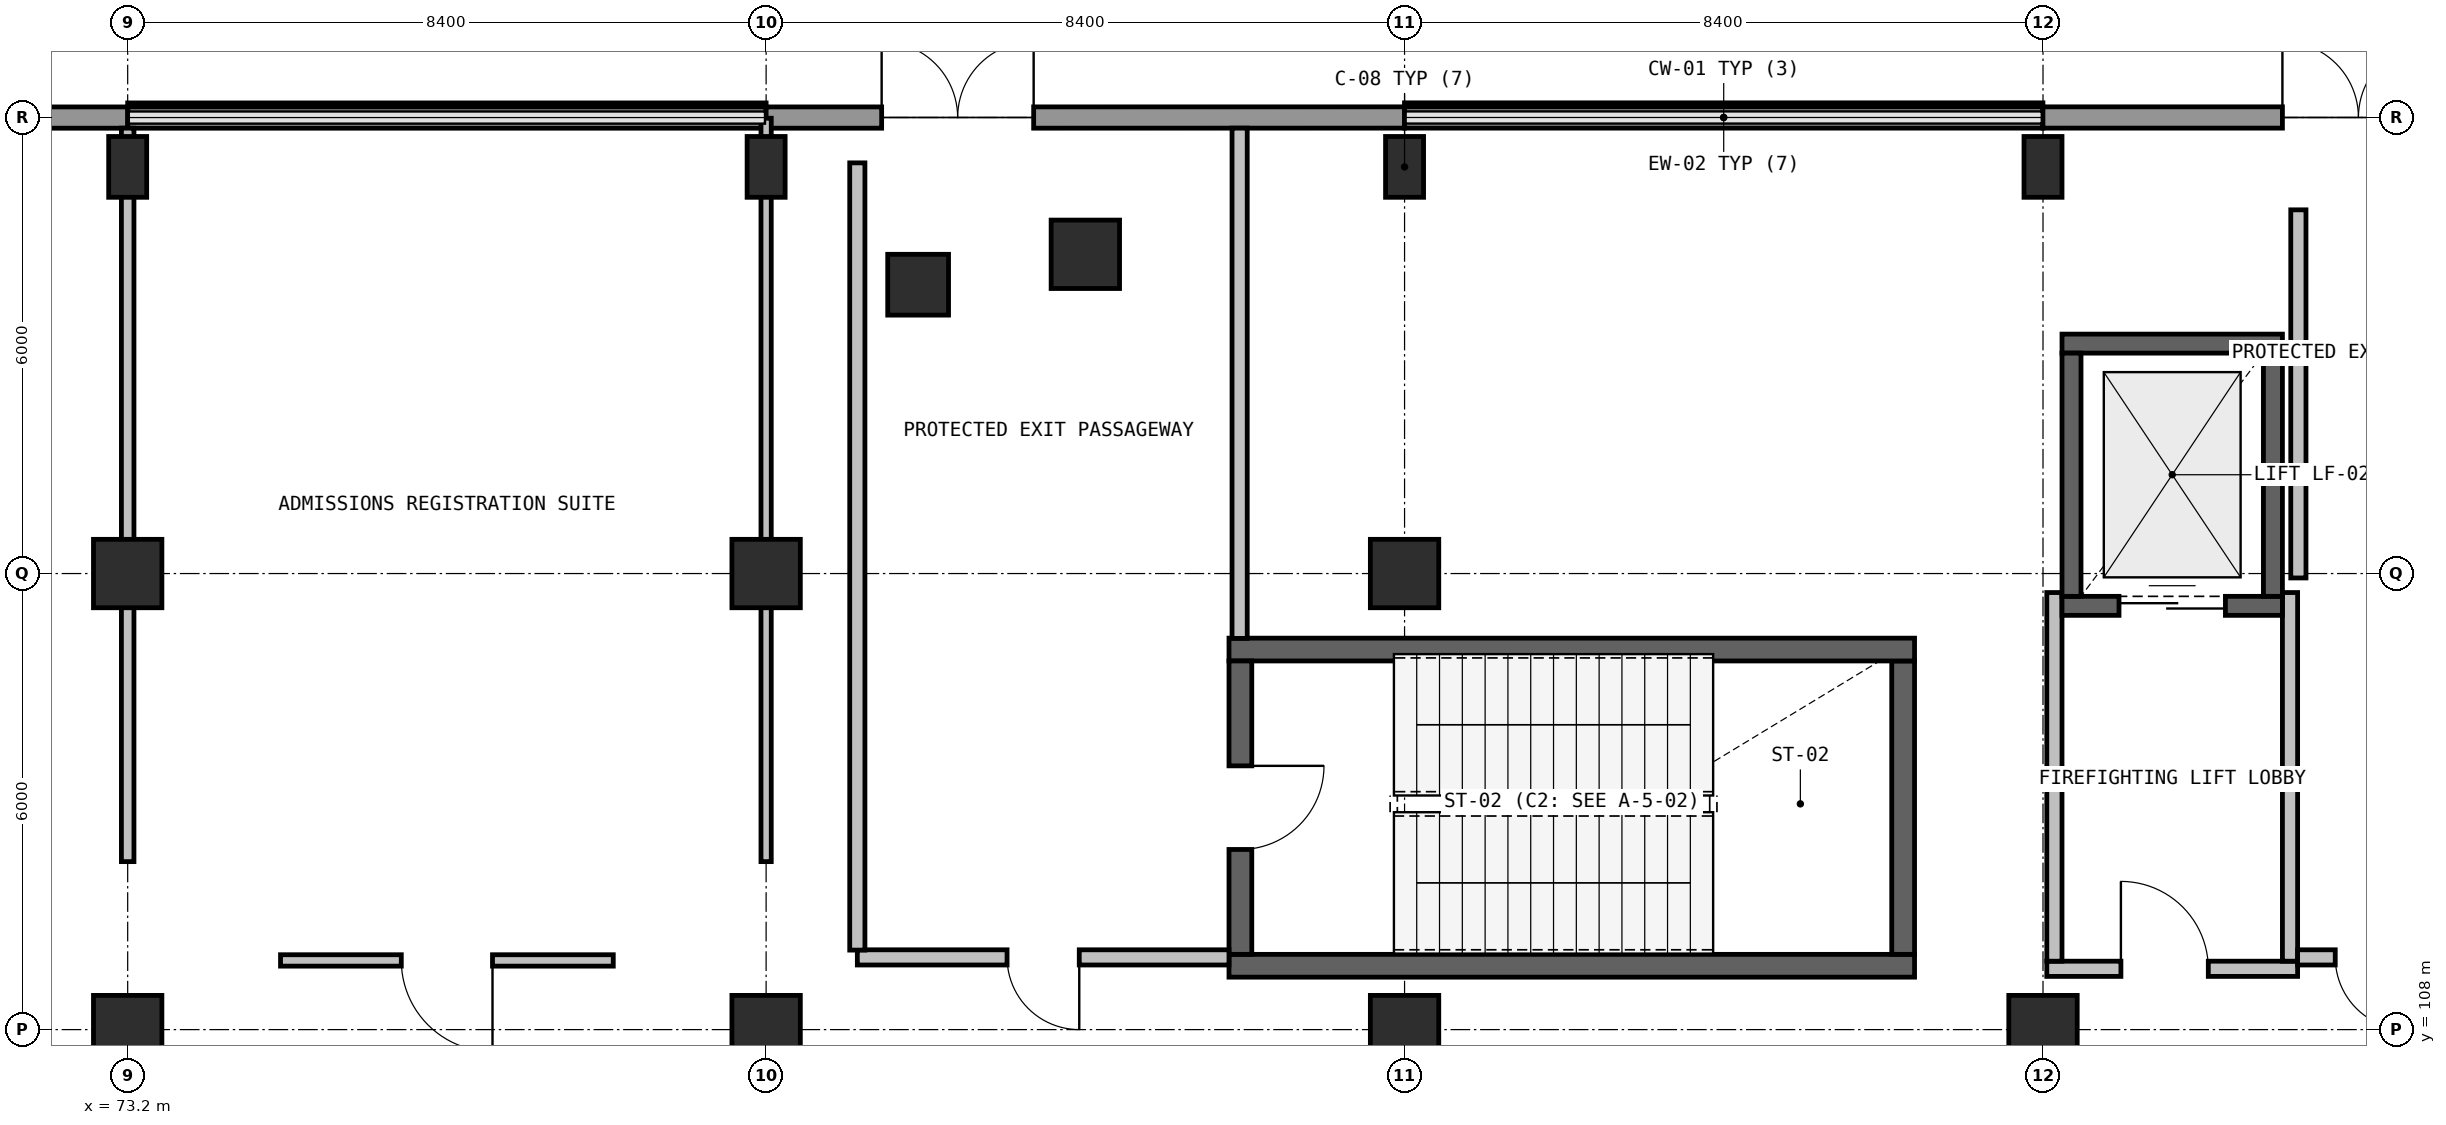
"""IFC4 building model, lengths in metres.
Left out: names, types, materials, properties, quantities, classifications, styles, units other than length and angle.
Written with IfcOpenShell. Run it as: python <this file> out.ifc"""

import sys

from ifc_helpers import new_model, si_unit, direction, frame, frame_2d, origin, origin_2d, place, context, subcontext, project, spatial, rectangle, extrude, element, fill, save


model = new_model("IFC4")
c1 = context("Model", 3, precision=1e-05, world=origin(), true_north=direction((0.0, 1.0)))
c2 = subcontext(c1, "Body", "Model", "MODEL_VIEW")
j1 = project(units=[si_unit("LENGTHUNIT", "METRE"), si_unit("PLANEANGLEUNIT", "RADIAN")], contexts=[c1])
p1 = place(None, origin())
s1 = spatial("IfcSite", under=j1, at=p1, CompositionType="ELEMENT")
p2 = place(p1, origin())
s2 = spatial("IfcBuilding", under=s1, at=p2, CompositionType="ELEMENT")
p3 = place(p2, origin())
s3 = spatial("IfcBuildingStorey", under=s2, at=p3, CompositionType="ELEMENT", Elevation=0.0)
p4 = place(p3, frame((83.6, 117.8, 0.0), z_axis=(0.0, 0.0, 1.0), x_axis=(1.0, 0.0, 0.0)))
e1 = element("IfcColumn", 1, at=p4, inside=s3, PredefinedType="COLUMN", context=c2, shape_type="SweptSolid", body=[
    extrude(rectangle(XDim=0.8, YDim=0.8, at=origin_2d()), origin(), (0.0, 0.0, 1.0), 5.4),
])
for number, where, z_axis, x_axis in (
    (2, (85.8, 118.2, 0.0), (0.0, 0.0, 1.0), (1.0, 0.0, 0.0)),
    (3, (73.2, 108.0, 0.0), (0.0, 0.0, 1.0), (1.0, 0.0, 0.0)),
    (4, (73.2, 114.0, 0.0), (0.0, 0.0, 1.0), (1.0, 0.0, 0.0)),
):
    element("IfcColumn", number, at=place(p3, frame(where, z_axis=z_axis, x_axis=x_axis)), inside=s3, PredefinedType="COLUMN", context=c2, shape_type="SweptSolid", body=[
        extrude(rectangle(XDim=0.9, YDim=0.9, at=origin_2d()), origin(), (0.0, 0.0, 1.0), 5.4),
    ])
p5 = place(p3, frame((73.2, 119.35, 0.0), z_axis=(0.0, 0.0, 1.0), x_axis=(1.0, 0.0, 0.0)))
e5 = element("IfcColumn", 5, at=p5, inside=s3, PredefinedType="COLUMN", context=c2, shape_type="SweptSolid", body=[
    extrude(rectangle(XDim=0.5, YDim=0.8, at=origin_2d()), origin(), (0.0, 0.0, 1.0), 5.4),
])
for number, where, z_axis, x_axis in (
    (6, (81.6, 108.0, 0.0), (0.0, 0.0, 1.0), (1.0, 0.0, 0.0)),
    (7, (81.6, 114.0, 0.0), (0.0, 0.0, 1.0), (1.0, 0.0, 0.0)),
):
    element("IfcColumn", number, at=place(p3, frame(where, z_axis=z_axis, x_axis=x_axis)), inside=s3, PredefinedType="COLUMN", context=c2, shape_type="SweptSolid", body=[
        extrude(rectangle(XDim=0.9, YDim=0.9, at=origin_2d()), origin(), (0.0, 0.0, 1.0), 5.4),
    ])
p6 = place(p3, frame((81.6, 119.35, 0.0), z_axis=(0.0, 0.0, 1.0), x_axis=(1.0, 0.0, 0.0)))
e8 = element("IfcColumn", 8, at=p6, inside=s3, PredefinedType="COLUMN", context=c2, shape_type="SweptSolid", body=[
    extrude(rectangle(XDim=0.5, YDim=0.8, at=origin_2d()), origin(), (0.0, 0.0, 1.0), 5.4),
])
for number, where, z_axis, x_axis in (
    (9, (90.0, 108.0, 0.0), (0.0, 0.0, 1.0), (1.0, 0.0, 0.0)),
    (10, (90.0, 114.0, 0.0), (0.0, 0.0, 1.0), (1.0, 0.0, 0.0)),
):
    element("IfcColumn", number, at=place(p3, frame(where, z_axis=z_axis, x_axis=x_axis)), inside=s3, PredefinedType="COLUMN", context=c2, shape_type="SweptSolid", body=[
        extrude(rectangle(XDim=0.9, YDim=0.9, at=origin_2d()), origin(), (0.0, 0.0, 1.0), 5.4),
    ])
p7 = place(p3, frame((90.0, 119.35, 0.0), z_axis=(0.0, 0.0, 1.0), x_axis=(1.0, 0.0, 0.0)))
e11 = element("IfcColumn", 11, at=p7, inside=s3, PredefinedType="COLUMN", context=c2, shape_type="SweptSolid", body=[
    extrude(rectangle(XDim=0.5, YDim=0.8, at=origin_2d()), origin(), (0.0, 0.0, 1.0), 5.4),
])
p8 = place(p3, frame((98.4, 108.0, 0.0), z_axis=(0.0, 0.0, 1.0), x_axis=(1.0, 0.0, 0.0)))
e12 = element("IfcColumn", 12, at=p8, inside=s3, PredefinedType="COLUMN", context=c2, shape_type="SweptSolid", body=[
    extrude(rectangle(XDim=0.9, YDim=0.9, at=origin_2d()), origin(), (0.0, 0.0, 1.0), 5.4),
])
p9 = place(p3, frame((98.4, 119.35, 0.0), z_axis=(0.0, 0.0, 1.0), x_axis=(1.0, 0.0, 0.0)))
e13 = element("IfcColumn", 13, at=p9, inside=s3, PredefinedType="COLUMN", context=c2, shape_type="SweptSolid", body=[
    extrude(rectangle(XDim=0.5, YDim=0.8, at=origin_2d()), origin(), (0.0, 0.0, 1.0), 5.4),
])
p10 = place(p3, frame((64.8, 119.999, 0.0), z_axis=(0.0, 0.0, 1.0), x_axis=(1.0, 0.0, 0.0)))
e14 = element("IfcWall", 14, at=p10, inside=s3, PredefinedType="SOLIDWALL", context=c2, shape_type="SweptSolid", body=[
    extrude(rectangle(XDim=8.4, YDim=0.28, at=frame_2d((4.2, 0.0))), origin(), (0.0, 0.0, 1.0), 5.08),
])
p11 = place(p10, frame((3.2, 0.0, 0.0)))
e15 = element("IfcOpeningElement", 15, at=p11, cuts=e14, PredefinedType="OPENING", context=c2, shape_type="SweptSolid", body=[
    extrude(rectangle(XDim=2.0, YDim=2.3, at=frame_2d((1.0, 1.15))), frame((0.0, 0.15, 0.0), z_axis=(0.0, -1.0, 0.0), x_axis=(1.0, 0.0, 0.0)), (0.0, 0.0, 1.0), 0.3),
])
p12 = place(p3, frame((73.202, 119.999, 0.0), z_axis=(0.0, 0.0, 1.0), x_axis=(1.0, 0.0, 0.0)))
e16 = element("IfcWall", 16, at=p12, inside=s3, PredefinedType="SOLIDWALL", context=c2, shape_type="SweptSolid", body=[
    extrude(rectangle(XDim=8.396, YDim=0.28, at=frame_2d((4.198, 0.0))), origin(), (0.0, 0.0, 1.0), 0.94),
])
p13 = place(p3, frame((81.6, 119.999, 0.0), z_axis=(0.0, 0.0, 1.0), x_axis=(0.99999999324, 0.000116272309, 0.0)))
e17 = element("IfcWall", 17, at=p13, inside=s3, PredefinedType="SOLIDWALL", context=c2, shape_type="SweptSolid", body=[
    extrude(rectangle(XDim=8.399, YDim=0.28, at=frame_2d((4.199, 0.0))), origin(), (0.0, 0.0, 1.0), 5.08),
])
p14 = place(p13, frame((1.52, 0.0, 0.0)))
e18 = element("IfcOpeningElement", 18, at=p14, cuts=e17, PredefinedType="OPENING", context=c2, shape_type="SweptSolid", body=[
    extrude(rectangle(XDim=2.0, YDim=2.3, at=frame_2d((1.0, 1.15))), frame((0.0, 0.15, 0.0), z_axis=(0.0, -1.0, 0.0), x_axis=(1.0, 0.0, 0.0)), (0.0, 0.0, 1.0), 0.3),
])
p15 = place(p3, frame((90.001, 120.0, 0.0), z_axis=(0.0, 0.0, 1.0), x_axis=(1.0, 0.0, 0.0)))
e19 = element("IfcWall", 19, at=p15, inside=s3, PredefinedType="SOLIDWALL", context=c2, shape_type="SweptSolid", body=[
    extrude(rectangle(XDim=8.396, YDim=0.28, at=frame_2d((4.198, 0.0))), origin(), (0.0, 0.0, 1.0), 0.94),
])
p16 = place(p3, frame((98.399, 120.0, 0.0), z_axis=(0.0, 0.0, 1.0), x_axis=(1.0, 0.0, 0.0)))
e20 = element("IfcWall", 20, at=p16, inside=s3, PredefinedType="SOLIDWALL", context=c2, shape_type="SweptSolid", body=[
    extrude(rectangle(XDim=8.4, YDim=0.28, at=frame_2d((4.2, 0.0))), origin(), (0.0, 0.0, 1.0), 5.08),
])
p17 = place(p16, frame((3.151, 0.0, 0.0)))
e21 = element("IfcOpeningElement", 21, at=p17, cuts=e20, PredefinedType="OPENING", context=c2, shape_type="SweptSolid", body=[
    extrude(rectangle(XDim=2.0, YDim=2.3, at=frame_2d((1.0, 1.15))), frame((0.0, 0.15, 0.0), z_axis=(0.0, -1.0, 0.0), x_axis=(1.0, 0.0, 0.0)), (0.0, 0.0, 1.0), 0.3),
])
p18 = place(p3, frame((87.69, 108.84, 0.0), z_axis=(0.0, 0.0, 1.0), x_axis=(1.0, 0.0, 0.0)))
e22 = element("IfcWall", 22, at=p18, inside=s3, PredefinedType="SHEAR", context=c2, shape_type="SweptSolid", body=[
    extrude(rectangle(XDim=9.02, YDim=0.3, at=frame_2d((4.51, 0.0))), origin(), (0.0, 0.0, 1.0), 5.08),
])
p19 = place(p3, frame((96.56, 108.99, 0.0), z_axis=(0.0, 0.0, 1.0), x_axis=(0.0, 1.0, 0.0)))
e23 = element("IfcWall", 23, at=p19, inside=s3, PredefinedType="SHEAR", context=c2, shape_type="SweptSolid", body=[
    extrude(rectangle(XDim=3.86, YDim=0.3, at=frame_2d((1.93, 0.0))), origin(), (0.0, 0.0, 1.0), 5.08),
])
p20 = place(p3, frame((96.71, 113.0, 0.0), z_axis=(0.0, 0.0, 1.0), x_axis=(-1.0, 0.0, 0.0)))
e24 = element("IfcWall", 24, at=p20, inside=s3, PredefinedType="SHEAR", context=c2, shape_type="SweptSolid", body=[
    extrude(rectangle(XDim=9.02, YDim=0.3, at=frame_2d((4.51, 0.0))), origin(), (0.0, 0.0, 1.0), 5.08),
])
p21 = place(p3, frame((87.84, 112.85, 0.0), z_axis=(0.0, 0.0, 1.0), x_axis=(0.0, -1.0, 0.0)))
e25 = element("IfcWall", 25, at=p21, inside=s3, PredefinedType="SHEAR", context=c2, shape_type="SweptSolid", body=[
    extrude(rectangle(XDim=3.86, YDim=0.3, at=frame_2d((1.93, 0.0))), origin(), (0.0, 0.0, 1.0), 5.08),
])
p22 = place(p21, frame((1.38, 0.0, 0.0)))
e26 = element("IfcOpeningElement", 26, at=p22, cuts=e25, PredefinedType="OPENING", context=c2, shape_type="SweptSolid", body=[
    extrude(rectangle(XDim=1.1, YDim=2.15, at=frame_2d((0.55, 1.075))), frame((0.0, 0.16, 0.0), z_axis=(0.0, -1.0, 0.0), x_axis=(1.0, 0.0, 0.0)), (0.0, 0.0, 1.0), 0.32),
])
p23 = place(p3, frame((98.45, 108.8, 0.0), z_axis=(0.0, 0.0, 1.0), x_axis=(1.0, 0.0, 0.0)))
e27 = element("IfcWall", 27, at=p23, inside=s3, PredefinedType="SOLIDWALL", context=c2, shape_type="SweptSolid", body=[
    extrude(rectangle(XDim=3.3, YDim=0.2, at=frame_2d((1.65, 0.0))), origin(), (0.0, 0.0, 1.0), 5.08),
])
p24 = place(p23, frame((0.975, 0.0, 0.0)))
e28 = element("IfcOpeningElement", 28, at=p24, cuts=e27, PredefinedType="OPENING", context=c2, shape_type="SweptSolid", body=[
    extrude(rectangle(XDim=1.15, YDim=2.15, at=frame_2d((0.575, 1.075))), frame((0.0, 0.11, 0.0), z_axis=(0.0, -1.0, 0.0), x_axis=(1.0, 0.0, 0.0)), (0.0, 0.0, 1.0), 0.22),
])
p25 = place(p3, frame((101.65, 108.9, 0.0), z_axis=(0.0, 0.0, 1.0), x_axis=(0.0, 1.0, 0.0)))
e29 = element("IfcWall", 29, at=p25, inside=s3, PredefinedType="SOLIDWALL", context=c2, shape_type="SweptSolid", body=[
    extrude(rectangle(XDim=4.85, YDim=0.2, at=frame_2d((2.425, 0.0))), origin(), (0.0, 0.0, 1.0), 5.08),
])
p26 = place(p3, frame((98.55, 113.75, 0.0), z_axis=(0.0, 0.0, 1.0), x_axis=(0.0, -1.0, 0.0)))
e30 = element("IfcWall", 30, at=p26, inside=s3, PredefinedType="SOLIDWALL", context=c2, shape_type="SweptSolid", body=[
    extrude(rectangle(XDim=4.85, YDim=0.2, at=frame_2d((2.425, 0.0))), origin(), (0.0, 0.0, 1.0), 4.33),
])
p27 = place(p3, frame((98.65, 113.575, 0.0), z_axis=(0.0, 0.0, 1.0), x_axis=(1.0, 0.0, 0.0)))
e31 = element("IfcWall", 31, at=p27, inside=s3, PredefinedType="SHEAR", context=c2, shape_type="SweptSolid", body=[
    extrude(rectangle(XDim=2.9, YDim=0.25, at=frame_2d((1.45, 0.0))), origin(), (0.0, 0.0, 1.0), 5.08),
])
p28 = place(p27, frame((0.75, 0.0, 0.0)))
e32 = element("IfcOpeningElement", 32, at=p28, cuts=e31, PredefinedType="OPENING", context=c2, shape_type="SweptSolid", body=[
    extrude(rectangle(XDim=1.4, YDim=2.15, at=frame_2d((0.7, 1.075))), frame((0.0, 0.135, 0.0), z_axis=(0.0, -1.0, 0.0), x_axis=(1.0, 0.0, 0.0)), (0.0, 0.0, 1.0), 0.27),
])
p29 = place(p3, frame((101.425, 113.7, 0.0), z_axis=(0.0, 0.0, 1.0), x_axis=(0.0, 1.0, 0.0)))
e33 = element("IfcWall", 33, at=p29, inside=s3, PredefinedType="SHEAR", context=c2, shape_type="SweptSolid", body=[
    extrude(rectangle(XDim=3.2, YDim=0.25, at=frame_2d((1.6, 0.0))), origin(), (0.0, 0.0, 1.0), 5.08),
])
p30 = place(p3, frame((101.55, 117.025, 0.0), z_axis=(0.0, 0.0, 1.0), x_axis=(-1.0, 0.0, 0.0)))
e34 = element("IfcWall", 34, at=p30, inside=s3, PredefinedType="SHEAR", context=c2, shape_type="SweptSolid", body=[
    extrude(rectangle(XDim=2.9, YDim=0.25, at=frame_2d((1.45, 0.0))), origin(), (0.0, 0.0, 1.0), 5.08),
])
p31 = place(p3, frame((98.775, 116.9, 0.0), z_axis=(0.0, 0.0, 1.0), x_axis=(0.0, -1.0, 0.0)))
e35 = element("IfcWall", 35, at=p31, inside=s3, PredefinedType="SHEAR", context=c2, shape_type="SweptSolid", body=[
    extrude(rectangle(XDim=3.2, YDim=0.25, at=frame_2d((1.6, 0.0))), origin(), (0.0, 0.0, 1.0), 5.08),
])
p32 = place(p3, frame((87.83, 119.86, 0.0), z_axis=(0.0, 0.0, 1.0), x_axis=(0.0, -1.0, 0.0)))
e36 = element("IfcWall", 36, at=p32, inside=s3, PredefinedType="SOLIDWALL", context=c2, shape_type="SweptSolid", body=[
    extrude(rectangle(XDim=6.713, YDim=0.2, at=frame_2d((3.356, 0.0))), origin(), (0.0, 0.0, 1.0), 5.08),
])
p33 = place(p3, frame((87.69, 108.95, 0.0), z_axis=(0.0, 0.0, 1.0), x_axis=(-1.0, 0.0, 0.0)))
e37 = element("IfcWall", 37, at=p33, inside=s3, PredefinedType="SOLIDWALL", context=c2, shape_type="SweptSolid", body=[
    extrude(rectangle(XDim=4.89, YDim=0.2, at=frame_2d((2.445, 0.0))), origin(), (0.0, 0.0, 1.0), 5.08),
])
p34 = place(p33, frame((1.97, 0.0, 0.0)))
e38 = element("IfcOpeningElement", 38, at=p34, cuts=e37, PredefinedType="OPENING", context=c2, shape_type="SweptSolid", body=[
    extrude(rectangle(XDim=0.95, YDim=2.1, at=frame_2d((0.475, 1.05))), frame((0.0, 0.11, 0.0), z_axis=(0.0, -1.0, 0.0), x_axis=(1.0, 0.0, 0.0)), (0.0, 0.0, 1.0), 0.22),
])
p35 = place(p3, frame((82.8, 109.046, 0.0), z_axis=(0.0, 0.0, 1.0), x_axis=(0.0, 1.0, 0.0)))
e39 = element("IfcWall", 39, at=p35, inside=s3, PredefinedType="SOLIDWALL", context=c2, shape_type="SweptSolid", body=[
    extrude(rectangle(XDim=10.357, YDim=0.2, at=frame_2d((5.179, 0.0))), origin(), (0.0, 0.0, 1.0), 5.08),
])
p36 = place(p3, frame((103.69, 108.95, 0.0), z_axis=(0.0, 0.0, 1.0), x_axis=(-1.0, 0.0, 0.0)))
e40 = element("IfcWall", 40, at=p36, inside=s3, PredefinedType="SOLIDWALL", context=c2, shape_type="SweptSolid", body=[
    extrude(rectangle(XDim=1.94, YDim=0.2, at=frame_2d((0.97, 0.0))), origin(), (0.0, 0.0, 1.0), 5.08),
])
p37 = place(p36, frame((0.495, 0.0, 0.0)))
e41 = element("IfcOpeningElement", 41, at=p37, cuts=e40, PredefinedType="OPENING", context=c2, shape_type="SweptSolid", body=[
    extrude(rectangle(XDim=0.95, YDim=2.1, at=frame_2d((0.475, 1.05))), frame((0.0, 0.11, 0.0), z_axis=(0.0, -1.0, 0.0), x_axis=(1.0, 0.0, 0.0)), (0.0, 0.0, 1.0), 0.22),
])
p38 = place(p3, frame((101.76, 113.942, 0.0), z_axis=(0.0, 0.0, 1.0), x_axis=(0.0, 1.0, 0.0)))
e42 = element("IfcWall", 42, at=p38, inside=s3, PredefinedType="SOLIDWALL", context=c2, shape_type="SweptSolid", body=[
    extrude(rectangle(XDim=4.843, YDim=0.2, at=frame_2d((2.421, 0.0))), origin(), (0.0, 0.0, 1.0), 5.08),
])
p39 = place(p3, frame((73.2, 119.86, 0.0), z_axis=(0.0, 0.0, 1.0), x_axis=(0.0, -1.0, 0.0)))
e43 = element("IfcWall", 43, at=p39, inside=s3, PredefinedType="PARTITIONING", context=c2, shape_type="SweptSolid", body=[
    extrude(rectangle(XDim=9.65, YDim=0.165, at=frame_2d((4.825, 0.0))), origin(), (0.0, 0.0, 1.0), 4.33),
])
p40 = place(p3, frame((79.589, 108.91, 0.0), z_axis=(0.0, 0.0, 1.0), x_axis=(-1.0, 0.0, 0.0)))
e44 = element("IfcWall", 44, at=p40, inside=s3, PredefinedType="PARTITIONING", context=c2, shape_type="SweptSolid", body=[
    extrude(rectangle(XDim=4.378, YDim=0.15, at=frame_2d((2.189, 0.0))), origin(), (0.0, 0.0, 1.0), 5.08),
])
p41 = place(p40, frame((1.589, 0.0, 0.0)))
e45 = element("IfcOpeningElement", 45, at=p41, cuts=e44, PredefinedType="OPENING", context=c2, shape_type="SweptSolid", body=[
    extrude(rectangle(XDim=1.2, YDim=2.15, at=frame_2d((0.6, 1.075))), frame((0.0, 0.085, 0.0), z_axis=(0.0, -1.0, 0.0), x_axis=(1.0, 0.0, 0.0)), (0.0, 0.0, 1.0), 0.17),
])
p42 = place(p3, frame((81.6, 119.99, 0.0), z_axis=(0.0, 0.0, 1.0), x_axis=(0.0, -1.0, 0.0)))
e46 = element("IfcWall", 46, at=p42, inside=s3, PredefinedType="PARTITIONING", context=c2, shape_type="SweptSolid", body=[
    extrude(rectangle(XDim=9.78, YDim=0.135, at=frame_2d((4.89, 0.0))), origin(), (0.0, 0.0, 1.0), 4.33),
])
p43 = place(p14, origin())
e47 = element("IfcDoor", 47, at=p43, inside=s3, OperationType="DOUBLE_DOOR_SINGLE_SWING", PredefinedType="DOOR", context=c2, shape_type="SweptSolid", body=[
    extrude(rectangle(XDim=2.0, YDim=2.3, at=frame_2d((1.0, 1.15))), frame((0.0, 0.025, 0.0), z_axis=(0.0, -1.0, 0.0), x_axis=(1.0, 0.0, 0.0)), (0.0, 0.0, 1.0), 0.05),
])
fill(e18, e47)
p44 = place(p17, origin())
e48 = element("IfcDoor", 48, at=p44, inside=s3, OperationType="DOUBLE_DOOR_SINGLE_SWING", PredefinedType="DOOR", context=c2, shape_type="SweptSolid", body=[
    extrude(rectangle(XDim=2.0, YDim=2.3, at=frame_2d((1.0, 1.15))), frame((0.0, 0.025, 0.0), z_axis=(0.0, -1.0, 0.0), x_axis=(1.0, 0.0, 0.0)), (0.0, 0.0, 1.0), 0.05),
])
fill(e21, e48)
p45 = place(p22, origin())
e49 = element("IfcDoor", 49, at=p45, inside=s3, OperationType="SINGLE_SWING_LEFT", PredefinedType="DOOR", context=c2, shape_type="SweptSolid", body=[
    extrude(rectangle(XDim=1.1, YDim=2.15, at=frame_2d((0.55, 1.075))), frame((0.0, 0.025, 0.0), z_axis=(0.0, -1.0, 0.0), x_axis=(1.0, 0.0, 0.0)), (0.0, 0.0, 1.0), 0.05),
])
fill(e26, e49)
p46 = place(p24, origin())
e50 = element("IfcDoor", 50, at=p46, inside=s3, OperationType="SINGLE_SWING_RIGHT", PredefinedType="DOOR", context=c2, shape_type="SweptSolid", body=[
    extrude(rectangle(XDim=1.15, YDim=2.15, at=frame_2d((0.575, 1.075))), frame((0.0, 0.025, 0.0), z_axis=(0.0, -1.0, 0.0), x_axis=(1.0, 0.0, 0.0)), (0.0, 0.0, 1.0), 0.05),
])
fill(e28, e50)
p47 = place(p28, origin())
e51 = element("IfcDoor", 51, at=p47, inside=s3, OperationType="DOUBLE_DOOR_SLIDING", PredefinedType="DOOR", context=c2, shape_type="SweptSolid", body=[
    extrude(rectangle(XDim=1.4, YDim=2.15, at=frame_2d((0.7, 1.075))), frame((0.0, 0.025, 0.0), z_axis=(0.0, -1.0, 0.0), x_axis=(1.0, 0.0, 0.0)), (0.0, 0.0, 1.0), 0.05),
])
fill(e32, e51)
p48 = place(p34, origin())
e52 = element("IfcDoor", 52, at=p48, inside=s3, OperationType="SINGLE_SWING_RIGHT", PredefinedType="DOOR", context=c2, shape_type="SweptSolid", body=[
    extrude(rectangle(XDim=0.95, YDim=2.1, at=frame_2d((0.475, 1.05))), frame((0.0, 0.025, 0.0), z_axis=(0.0, -1.0, 0.0), x_axis=(1.0, 0.0, 0.0)), (0.0, 0.0, 1.0), 0.05),
])
fill(e38, e52)
p49 = place(p37, origin())
e53 = element("IfcDoor", 53, at=p49, inside=s3, OperationType="SINGLE_SWING_LEFT", PredefinedType="DOOR", context=c2, shape_type="SweptSolid", body=[
    extrude(rectangle(XDim=0.95, YDim=2.1, at=frame_2d((0.475, 1.05))), frame((0.0, 0.025, 0.0), z_axis=(0.0, -1.0, 0.0), x_axis=(1.0, 0.0, 0.0)), (0.0, 0.0, 1.0), 0.05),
])
fill(e41, e53)
p50 = place(p41, origin())
e54 = element("IfcDoor", 54, at=p50, inside=s3, OperationType="SINGLE_SWING_RIGHT", PredefinedType="DOOR", context=c2, shape_type="SweptSolid", body=[
    extrude(rectangle(XDim=1.2, YDim=2.15, at=frame_2d((0.6, 1.075))), frame((0.0, 0.025, 0.0), z_axis=(0.0, -1.0, 0.0), x_axis=(1.0, 0.0, 0.0)), (0.0, 0.0, 1.0), 0.05),
])
fill(e45, e54)
save(model, sys.argv[1])
